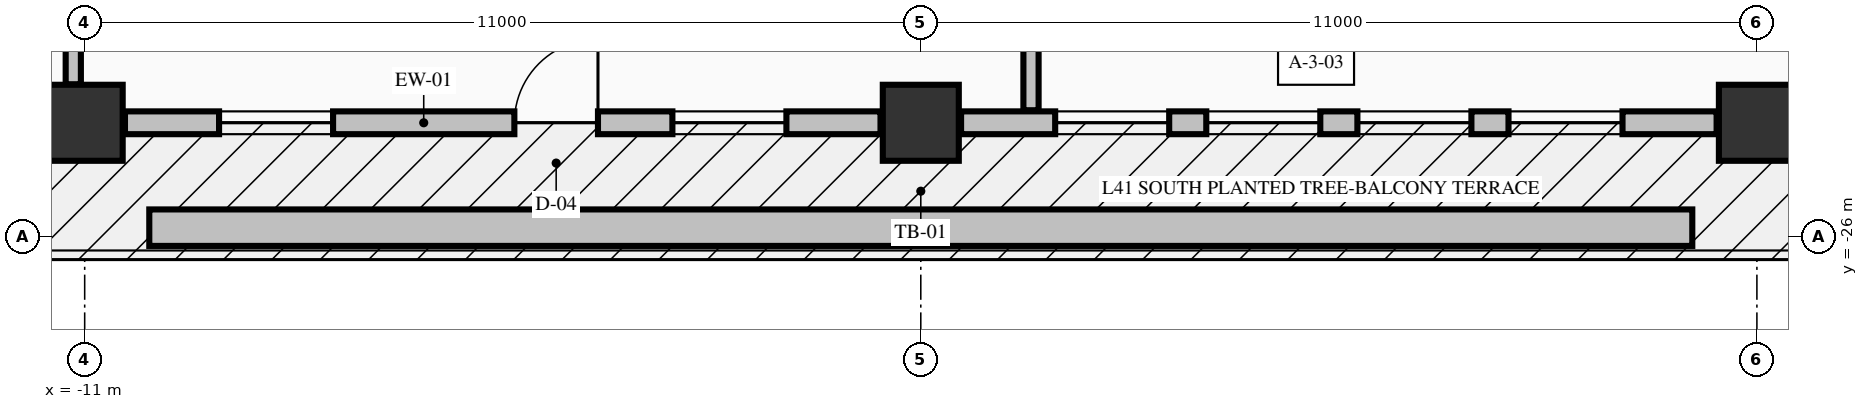
"""IFC4 building model, lengths in metres.
Left out: names, types, materials, properties, quantities, classifications, styles, units other than length and angle.
Written with IfcOpenShell. Run it as: python <this file> out.ifc"""

import sys

from ifc_helpers import new_model, si_unit, direction, frame, frame_2d, origin, origin_2d, place, context, subcontext, project, spatial, rectangle, extrude, element, fill, save


model = new_model("IFC4")
c1 = context("Model", 3, precision=1e-05, world=origin(), true_north=direction((0.0, 1.0)))
c2 = subcontext(c1, "Body", "Model", "MODEL_VIEW")
j1 = project(units=[si_unit("LENGTHUNIT", "METRE"), si_unit("PLANEANGLEUNIT", "RADIAN")], contexts=[c1])
p1 = place(None, origin())
s1 = spatial("IfcSite", under=j1, at=p1, CompositionType="ELEMENT")
p2 = place(p1, origin())
s2 = spatial("IfcBuilding", under=s1, at=p2, CompositionType="ELEMENT")
p3 = place(p2, frame((0.0, 0.0, 162.66)))
s3 = spatial("IfcBuildingStorey", under=s2, at=p3, CompositionType="ELEMENT", Elevation=162.66)
for number, where, z_axis, x_axis in (
    (1, (-11.0, -24.5, -0.25), (0.0, 0.0, 1.0), (1.0, 0.0, 0.0)),
    (2, (0.0, -24.5, -0.25), (0.0, 0.0, 1.0), (1.0, 0.0, 0.0)),
    (3, (11.0, -24.5, -0.25), (0.0, 0.0, 1.0), (1.0, 0.0, 0.0)),
):
    element("IfcColumn", number, at=place(p3, frame(where, z_axis=z_axis, x_axis=x_axis)), inside=s3, PredefinedType="COLUMN", context=c2, shape_type="SweptSolid", body=[
        extrude(rectangle(XDim=1.0, YDim=1.0, at=origin_2d()), origin(), (0.0, 0.0, 1.0), 3.4),
    ])
p4 = place(p3, frame((-10.47, -24.5, 0.0), z_axis=(0.0, 0.0, 1.0), x_axis=(1.0, 0.0, 0.0)))
e4 = element("IfcWall", 4, at=p4, inside=s3, PredefinedType="STANDARD", context=c2, shape_type="SweptSolid", body=[
    extrude(rectangle(XDim=9.94, YDim=0.3, at=frame_2d((4.97, 0.0))), origin(), (0.0, 0.0, 1.0), 2.542),
])
p5 = place(p4, frame((5.123, 0.0, 0.0)))
e5 = element("IfcOpeningElement", 5, at=p5, cuts=e4, PredefinedType="OPENING", context=c2, shape_type="SweptSolid", body=[
    extrude(rectangle(XDim=1.1, YDim=2.15, at=frame_2d((0.55, 1.075))), frame((0.0, 0.16, 0.0), z_axis=(0.0, -1.0, 0.0), x_axis=(1.0, 0.0, 0.0)), (0.0, 0.0, 1.0), 0.32),
])
p6 = place(p4, frame((1.238, 0.0, 0.72)))
e6 = element("IfcOpeningElement", 6, at=p6, cuts=e4, PredefinedType="OPENING", context=c2, shape_type="SweptSolid", body=[
    extrude(rectangle(XDim=1.5, YDim=1.6, at=frame_2d((0.75, 0.8))), frame((0.0, 0.16, 0.0), z_axis=(0.0, -1.0, 0.0), x_axis=(1.0, 0.0, 0.0)), (0.0, 0.0, 1.0), 0.32),
])
p7 = place(p4, frame((7.202, 0.0, 0.72)))
e7 = element("IfcOpeningElement", 7, at=p7, cuts=e4, PredefinedType="OPENING", context=c2, shape_type="SweptSolid", body=[
    extrude(rectangle(XDim=1.5, YDim=1.6, at=frame_2d((0.75, 0.8))), frame((0.0, 0.16, 0.0), z_axis=(0.0, -1.0, 0.0), x_axis=(1.0, 0.0, 0.0)), (0.0, 0.0, 1.0), 0.32),
])
p8 = place(p3, frame((0.53, -24.5, 0.0), z_axis=(0.0, 0.0, 1.0), x_axis=(1.0, 0.0, 0.0)))
e8 = element("IfcWall", 8, at=p8, inside=s3, PredefinedType="STANDARD", context=c2, shape_type="SweptSolid", body=[
    extrude(rectangle(XDim=9.94, YDim=0.3, at=frame_2d((4.97, 0.0))), origin(), (0.0, 0.0, 1.0), 2.542),
])
p9 = place(p8, frame((1.238, 0.0, 0.72)))
e9 = element("IfcOpeningElement", 9, at=p9, cuts=e8, PredefinedType="OPENING", context=c2, shape_type="SweptSolid", body=[
    extrude(rectangle(XDim=1.5, YDim=1.6, at=frame_2d((0.75, 0.8))), frame((0.0, 0.16, 0.0), z_axis=(0.0, -1.0, 0.0), x_axis=(1.0, 0.0, 0.0)), (0.0, 0.0, 1.0), 0.32),
])
p10 = place(p8, frame((3.226, 0.0, 0.72)))
e10 = element("IfcOpeningElement", 10, at=p10, cuts=e8, PredefinedType="OPENING", context=c2, shape_type="SweptSolid", body=[
    extrude(rectangle(XDim=1.5, YDim=1.6, at=frame_2d((0.75, 0.8))), frame((0.0, 0.16, 0.0), z_axis=(0.0, -1.0, 0.0), x_axis=(1.0, 0.0, 0.0)), (0.0, 0.0, 1.0), 0.32),
])
p11 = place(p8, frame((5.214, 0.0, 0.72)))
e11 = element("IfcOpeningElement", 11, at=p11, cuts=e8, PredefinedType="OPENING", context=c2, shape_type="SweptSolid", body=[
    extrude(rectangle(XDim=1.5, YDim=1.6, at=frame_2d((0.75, 0.8))), frame((0.0, 0.16, 0.0), z_axis=(0.0, -1.0, 0.0), x_axis=(1.0, 0.0, 0.0)), (0.0, 0.0, 1.0), 0.32),
])
p12 = place(p8, frame((7.202, 0.0, 0.72)))
e12 = element("IfcOpeningElement", 12, at=p12, cuts=e8, PredefinedType="OPENING", context=c2, shape_type="SweptSolid", body=[
    extrude(rectangle(XDim=1.5, YDim=1.6, at=frame_2d((0.75, 0.8))), frame((0.0, 0.16, 0.0), z_axis=(0.0, -1.0, 0.0), x_axis=(1.0, 0.0, 0.0)), (0.0, 0.0, 1.0), 0.32),
])
p13 = place(p3, frame((-11.15, -23.994, 0.0), z_axis=(0.0, 0.0, 1.0), x_axis=(0.0, 1.0, 0.0)))
e13 = element("IfcWall", 13, at=p13, inside=s3, PredefinedType="PARTITIONING", context=c2, shape_type="SweptSolid", body=[
    extrude(rectangle(XDim=10.791, YDim=0.2, at=frame_2d((5.396, 0.0))), origin(), (0.0, 0.0, 1.0), 2.342),
])
p14 = place(p3, frame((1.45, -24.335, 0.0), z_axis=(0.0, 0.0, 1.0), x_axis=(0.0, 1.0, 0.0)))
e14 = element("IfcWall", 14, at=p14, inside=s3, PredefinedType="PARTITIONING", context=c2, shape_type="SweptSolid", body=[
    extrude(rectangle(XDim=8.907, YDim=0.2, at=frame_2d((4.454, 0.0))), origin(), (0.0, 0.0, 1.0), 3.15),
])
p15 = place(p3, frame((-10.15, -25.88, -0.04), z_axis=(0.0, 0.0, 1.0), x_axis=(1.0, 0.0, 0.0)))
e15 = element("IfcWall", 15, at=p15, inside=s3, PredefinedType="PARAPET", context=c2, shape_type="SweptSolid", body=[
    extrude(rectangle(XDim=20.3, YDim=0.48, at=frame_2d((10.15, 0.0))), origin(), (0.0, 0.0, 1.0), 0.52),
])
p16 = place(p5, origin())
e16 = element("IfcDoor", 16, at=p16, inside=s3, OperationType="SINGLE_SWING_RIGHT", PredefinedType="DOOR", context=c2, shape_type="SweptSolid", body=[
    extrude(rectangle(XDim=1.1, YDim=2.15, at=frame_2d((0.55, 1.075))), frame((0.0, 0.025, 0.0), z_axis=(0.0, -1.0, 0.0), x_axis=(1.0, 0.0, 0.0)), (0.0, 0.0, 1.0), 0.05),
])
fill(e5, e16)
p17 = place(p6, origin())
e17 = element("IfcWindow", 17, at=p17, inside=s3, PartitioningType="SINGLE_PANEL", PredefinedType="WINDOW", context=c2, shape_type="SweptSolid", body=[
    extrude(rectangle(XDim=1.5, YDim=1.6, at=frame_2d((0.75, 0.8))), frame((0.0, 0.03, 0.0), z_axis=(0.0, -1.0, 0.0), x_axis=(1.0, 0.0, 0.0)), (0.0, 0.0, 1.0), 0.06),
])
fill(e6, e17)
p18 = place(p7, origin())
e18 = element("IfcWindow", 18, at=p18, inside=s3, PartitioningType="SINGLE_PANEL", PredefinedType="WINDOW", context=c2, shape_type="SweptSolid", body=[
    extrude(rectangle(XDim=1.5, YDim=1.6, at=frame_2d((0.75, 0.8))), frame((0.0, 0.03, 0.0), z_axis=(0.0, -1.0, 0.0), x_axis=(1.0, 0.0, 0.0)), (0.0, 0.0, 1.0), 0.06),
])
fill(e7, e18)
p19 = place(p9, origin())
e19 = element("IfcWindow", 19, at=p19, inside=s3, PartitioningType="SINGLE_PANEL", PredefinedType="WINDOW", context=c2, shape_type="SweptSolid", body=[
    extrude(rectangle(XDim=1.5, YDim=1.6, at=frame_2d((0.75, 0.8))), frame((0.0, 0.03, 0.0), z_axis=(0.0, -1.0, 0.0), x_axis=(1.0, 0.0, 0.0)), (0.0, 0.0, 1.0), 0.06),
])
fill(e9, e19)
p20 = place(p10, origin())
e20 = element("IfcWindow", 20, at=p20, inside=s3, PartitioningType="SINGLE_PANEL", PredefinedType="WINDOW", context=c2, shape_type="SweptSolid", body=[
    extrude(rectangle(XDim=1.5, YDim=1.6, at=frame_2d((0.75, 0.8))), frame((0.0, 0.03, 0.0), z_axis=(0.0, -1.0, 0.0), x_axis=(1.0, 0.0, 0.0)), (0.0, 0.0, 1.0), 0.06),
])
fill(e10, e20)
p21 = place(p11, origin())
e21 = element("IfcWindow", 21, at=p21, inside=s3, PartitioningType="SINGLE_PANEL", PredefinedType="WINDOW", context=c2, shape_type="SweptSolid", body=[
    extrude(rectangle(XDim=1.5, YDim=1.6, at=frame_2d((0.75, 0.8))), frame((0.0, 0.03, 0.0), z_axis=(0.0, -1.0, 0.0), x_axis=(1.0, 0.0, 0.0)), (0.0, 0.0, 1.0), 0.06),
])
fill(e11, e21)
p22 = place(p12, origin())
e22 = element("IfcWindow", 22, at=p22, inside=s3, PartitioningType="SINGLE_PANEL", PredefinedType="WINDOW", context=c2, shape_type="SweptSolid", body=[
    extrude(rectangle(XDim=1.5, YDim=1.6, at=frame_2d((0.75, 0.8))), frame((0.0, 0.03, 0.0), z_axis=(0.0, -1.0, 0.0), x_axis=(1.0, 0.0, 0.0)), (0.0, 0.0, 1.0), 0.06),
])
fill(e12, e22)
save(model, sys.argv[1])
